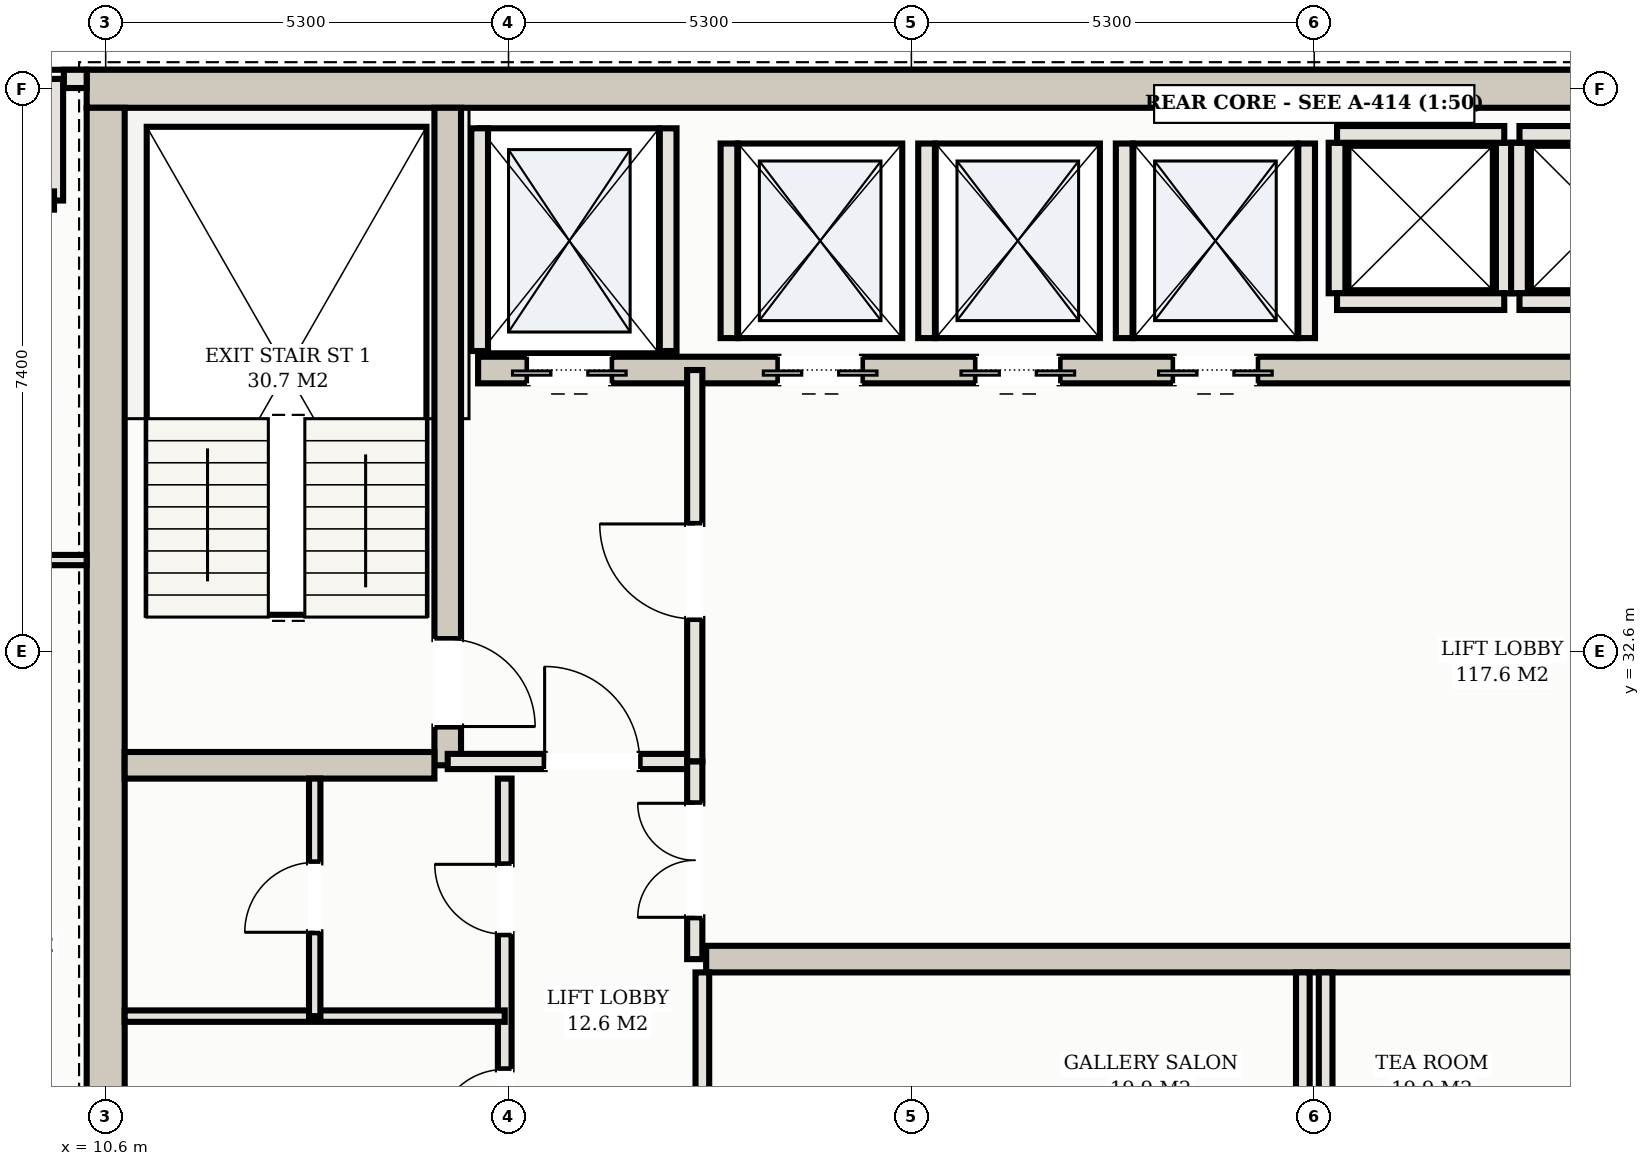
"""IFC4 building model, lengths in metres.
Left out: names, types, materials, properties, quantities, classifications, styles, units other than length and angle.
Written with IfcOpenShell. Run it as: python <this file> out.ifc"""

import sys

from ifc_helpers import new_model, si_unit, direction, frame, frame_2d, origin, place, context, subcontext, project, spatial, rectangle, extrude, element, fill, save


model = new_model("IFC4")
c1 = context("Model", 3, precision=1e-05, world=origin(), true_north=direction((0.0, 1.0)))
c2 = subcontext(c1, "Body", "Model", "MODEL_VIEW")
j1 = project(units=[si_unit("LENGTHUNIT", "METRE"), si_unit("PLANEANGLEUNIT", "RADIAN")], contexts=[c1])
p1 = place(None, origin())
s1 = spatial("IfcSite", under=j1, at=p1, CompositionType="ELEMENT")
p2 = place(p1, origin())
s2 = spatial("IfcBuilding", under=s1, at=p2, CompositionType="ELEMENT")
p3 = place(p2, frame((0.0, 0.0, 200.0)))
s3 = spatial("IfcBuildingStorey", under=s2, at=p3, CompositionType="ELEMENT", Elevation=200.0)
p4 = place(p3, frame((10.35, 40.0, 0.0), z_axis=(0.0, 0.0, 1.0), x_axis=(1.0, 0.0, 0.0)))
e1 = element("IfcWall", 1, at=p4, inside=s3, PredefinedType="SHEAR", context=c2, shape_type="SweptSolid", body=[
    extrude(rectangle(XDim=32.3, YDim=0.5, at=frame_2d((16.15, 0.0))), origin(), (0.0, 0.0, 1.0), 3.11),
])
p5 = place(p3, frame((10.6, 25.45, 0.0), z_axis=(0.0, 0.0, 1.0), x_axis=(0.0, 1.0, 0.0)))
e2 = element("IfcWall", 2, at=p5, inside=s3, PredefinedType="SHEAR", context=c2, shape_type="SweptSolid", body=[
    extrude(rectangle(XDim=14.3, YDim=0.5, at=frame_2d((7.15, 0.0))), origin(), (0.0, 0.0, 1.0), 3.11),
])
p6 = place(p3, frame((15.1, 31.1, 0.0), z_axis=(0.0, 0.0, 1.0), x_axis=(0.0, 1.0, 0.0)))
e3 = element("IfcWall", 3, at=p6, inside=s3, PredefinedType="SHEAR", context=c2, shape_type="SweptSolid", body=[
    extrude(rectangle(XDim=8.65, YDim=0.35, at=frame_2d((4.325, 0.0))), origin(), (0.0, 0.0, 1.0), 3.11),
])
p7 = place(p6, frame((0.51, 0.0, 0.0)))
e4 = element("IfcOpeningElement", 4, at=p7, cuts=e3, PredefinedType="OPENING", context=c2, shape_type="SweptSolid", body=[
    extrude(rectangle(XDim=1.15, YDim=2.2, at=frame_2d((0.575, 1.1))), frame((0.0, 0.185, 0.0), z_axis=(0.0, -1.0, 0.0), x_axis=(1.0, 0.0, 0.0)), (0.0, 0.0, 1.0), 0.37),
])
p8 = place(p3, frame((10.85, 31.1, 0.0), z_axis=(0.0, 0.0, 1.0), x_axis=(1.0, 0.0, 0.0)))
e5 = element("IfcWall", 5, at=p8, inside=s3, PredefinedType="SHEAR", context=c2, shape_type="SweptSolid", body=[
    extrude(rectangle(XDim=4.075, YDim=0.35, at=frame_2d((2.038, 0.0))), origin(), (0.0, 0.0, 1.0), 3.11),
])
p9 = place(p3, frame((15.5, 36.3, 0.0), z_axis=(0.0, 0.0, 1.0), x_axis=(1.0, 0.0, 0.0)))
e6 = element("IfcWall", 6, at=p9, inside=s3, PredefinedType="SHEAR", context=c2, shape_type="SweptSolid", body=[
    extrude(rectangle(XDim=22.0, YDim=0.35, at=frame_2d((11.0, 0.0))), origin(), (0.0, 0.0, 1.0), 3.11),
])
p10 = place(p9, frame((0.65, 0.0, 0.0)))
e7 = element("IfcOpeningElement", 7, at=p10, cuts=e6, PredefinedType="OPENING", context=c2, shape_type="SweptSolid", body=[
    extrude(rectangle(XDim=1.1, YDim=2.15, at=frame_2d((0.55, 1.075))), frame((0.0, 0.185, 0.0), z_axis=(0.0, -1.0, 0.0), x_axis=(1.0, 0.0, 0.0)), (0.0, 0.0, 1.0), 0.37),
])
p11 = place(p9, frame((20.25, 0.0, 0.0)))
e8 = element("IfcOpeningElement", 8, at=p11, cuts=e6, PredefinedType="OPENING", context=c2, shape_type="SweptSolid", body=[
    extrude(rectangle(XDim=1.1, YDim=2.15, at=frame_2d((0.55, 1.075))), frame((0.0, 0.185, 0.0), z_axis=(0.0, -1.0, 0.0), x_axis=(1.0, 0.0, 0.0)), (0.0, 0.0, 1.0), 0.37),
])
p12 = place(p9, frame((17.05, 0.0, 0.0)))
e9 = element("IfcOpeningElement", 9, at=p12, cuts=e6, PredefinedType="OPENING", context=c2, shape_type="SweptSolid", body=[
    extrude(rectangle(XDim=1.3, YDim=2.2, at=frame_2d((0.65, 1.1))), frame((0.0, 0.185, 0.0), z_axis=(0.0, -1.0, 0.0), x_axis=(1.0, 0.0, 0.0)), (0.0, 0.0, 1.0), 0.37),
])
p13 = place(p9, frame((3.95, 0.0, 0.0)))
e10 = element("IfcOpeningElement", 10, at=p13, cuts=e6, PredefinedType="OPENING", context=c2, shape_type="SweptSolid", body=[
    extrude(rectangle(XDim=1.1, YDim=2.15, at=frame_2d((0.55, 1.075))), frame((0.0, 0.185, 0.0), z_axis=(0.0, -1.0, 0.0), x_axis=(1.0, 0.0, 0.0)), (0.0, 0.0, 1.0), 0.37),
])
p14 = place(p9, frame((6.55, 0.0, 0.0)))
e11 = element("IfcOpeningElement", 11, at=p14, cuts=e6, PredefinedType="OPENING", context=c2, shape_type="SweptSolid", body=[
    extrude(rectangle(XDim=1.1, YDim=2.15, at=frame_2d((0.55, 1.075))), frame((0.0, 0.185, 0.0), z_axis=(0.0, -1.0, 0.0), x_axis=(1.0, 0.0, 0.0)), (0.0, 0.0, 1.0), 0.37),
])
p15 = place(p9, frame((9.15, 0.0, 0.0)))
e12 = element("IfcOpeningElement", 12, at=p15, cuts=e6, PredefinedType="OPENING", context=c2, shape_type="SweptSolid", body=[
    extrude(rectangle(XDim=1.1, YDim=2.15, at=frame_2d((0.55, 1.075))), frame((0.0, 0.185, 0.0), z_axis=(0.0, -1.0, 0.0), x_axis=(1.0, 0.0, 0.0)), (0.0, 0.0, 1.0), 0.37),
])
p16 = place(p3, frame((18.5, 28.55, 0.0), z_axis=(0.0, 0.0, 1.0), x_axis=(1.0, 0.0, 0.0)))
e13 = element("IfcWall", 13, at=p16, inside=s3, PredefinedType="SHEAR", context=c2, shape_type="SweptSolid", body=[
    extrude(rectangle(XDim=16.0, YDim=0.35, at=frame_2d((8.0, 0.0))), origin(), (0.0, 0.0, 1.0), 3.11),
])
for number, where, z_axis, x_axis in (
    (14, (15.52, 36.55, 0.0), (0.0, 0.0, 1.0), (0.0, 1.0, 0.0)),
    (15, (18.0, 36.55, 0.0), (0.0, 0.0, 1.0), (0.0, 1.0, 0.0)),
):
    element("IfcWall", number, at=place(p3, frame(where, z_axis=z_axis, x_axis=x_axis)), inside=s3, PredefinedType="SOLIDWALL", context=c2, shape_type="SweptSolid", body=[
        extrude(rectangle(XDim=2.93, YDim=0.22, at=frame_2d((1.465, 0.0))), origin(), (0.0, 0.0, 1.0), 3.11),
    ])
for number, where, z_axis, x_axis in (
    (16, (18.8, 36.72, 0.0), (0.0, 0.0, 1.0), (0.0, 1.0, 0.0)),
    (17, (21.4, 36.72, 0.0), (0.0, 0.0, 1.0), (0.0, 1.0, 0.0)),
    (18, (24.0, 36.72, 0.0), (0.0, 0.0, 1.0), (0.0, 1.0, 0.0)),
    (19, (26.4, 36.72, 0.0), (0.0, 0.0, 1.0), (0.0, 1.0, 0.0)),
):
    element("IfcWall", number, at=place(p3, frame(where, z_axis=z_axis, x_axis=x_axis)), inside=s3, PredefinedType="SOLIDWALL", context=c2, shape_type="SweptSolid", body=[
        extrude(rectangle(XDim=2.56, YDim=0.22, at=frame_2d((1.28, 0.0))), origin(), (0.0, 0.0, 1.0), 3.11),
    ])
for number, where, z_axis, x_axis in (
    (20, (26.8, 37.31, 0.0), (0.0, 0.0, 1.0), (0.0, 1.0, 0.0)),
    (21, (29.0, 37.31, 0.0), (0.0, 0.0, 1.0), (0.0, 1.0, 0.0)),
):
    element("IfcWall", number, at=place(p3, frame(where, z_axis=z_axis, x_axis=x_axis)), inside=s3, PredefinedType="SOLIDWALL", context=c2, shape_type="SweptSolid", body=[
        extrude(rectangle(XDim=1.98, YDim=0.22, at=frame_2d((0.99, 0.0))), origin(), (0.0, 0.0, 1.0), 3.11),
    ])
for number, where, z_axis, x_axis in (
    (22, (26.8, 39.4, 0.0), (0.0, 0.0, 1.0), (1.0, 0.0, 0.0)),
    (23, (26.8, 37.2, 0.0), (0.0, 0.0, 1.0), (1.0, 0.0, 0.0)),
):
    element("IfcWall", number, at=place(p3, frame(where, z_axis=z_axis, x_axis=x_axis)), inside=s3, PredefinedType="SOLIDWALL", context=c2, shape_type="SweptSolid", body=[
        extrude(rectangle(XDim=2.2, YDim=0.22, at=frame_2d((1.1, 0.0))), origin(), (0.0, 0.0, 1.0), 3.11),
    ])
p17 = place(p3, frame((29.2, 37.31, 0.0), z_axis=(0.0, 0.0, 1.0), x_axis=(0.0, 1.0, 0.0)))
e24 = element("IfcWall", 24, at=p17, inside=s3, PredefinedType="SOLIDWALL", context=c2, shape_type="SweptSolid", body=[
    extrude(rectangle(XDim=1.98, YDim=0.22, at=frame_2d((0.99, 0.0))), origin(), (0.0, 0.0, 1.0), 3.11),
])
for number, where, z_axis, x_axis in (
    (25, (29.2, 39.4, 0.0), (0.0, 0.0, 1.0), (1.0, 0.0, 0.0)),
    (26, (29.2, 37.2, 0.0), (0.0, 0.0, 1.0), (1.0, 0.0, 0.0)),
):
    element("IfcWall", number, at=place(p3, frame(where, z_axis=z_axis, x_axis=x_axis)), inside=s3, PredefinedType="SOLIDWALL", context=c2, shape_type="SweptSolid", body=[
        extrude(rectangle(XDim=2.2, YDim=0.22, at=frame_2d((1.1, 0.0))), origin(), (0.0, 0.0, 1.0), 3.11),
    ])
p18 = place(p3, frame((10.35, 40.13, 0.0), z_axis=(0.0, 0.0, 1.0), x_axis=(-1.0, 0.0, 0.0)))
e27 = element("IfcWall", 27, at=p18, inside=s3, PredefinedType="SOLIDWALL", context=c2, shape_type="SweptSolid", body=[
    extrude(rectangle(XDim=0.3, YDim=0.24, at=frame_2d((0.15, 0.0))), origin(), (0.0, 0.0, 1.0), 3.11),
])
for number, where, z_axis, x_axis in (
    (28, (9.92, 40.13, 0.0), (0.0, 0.0, 1.0), (0.0, -1.0, 0.0)),
    (29, (9.92, 38.53, 0.0), (0.0, 0.0, 1.0), (-1.0, 0.0, 0.0)),
):
    element("IfcWall", number, at=place(p3, frame(where, z_axis=z_axis, x_axis=x_axis)), inside=s3, PredefinedType="SOLIDWALL", context=c2, shape_type="SweptSolid", body=[
        extrude(rectangle(XDim=1.6, YDim=0.24, at=frame_2d((0.8, 0.0))), origin(), (0.0, 0.0, 1.0), 3.11),
    ])
p19 = place(p3, frame((15.1, 31.15, 0.0), z_axis=(0.0, 0.0, 1.0), x_axis=(1.0, 0.0, 0.0)))
e30 = element("IfcWall", 30, at=p19, inside=s3, PredefinedType="PARTITIONING", context=c2, shape_type="SweptSolid", body=[
    extrude(rectangle(XDim=3.25, YDim=0.2, at=frame_2d((1.625, 0.0))), origin(), (0.0, 0.0, 1.0), 2.43),
])
p20 = place(p19, frame((1.275, 0.0, 0.0)))
e31 = element("IfcOpeningElement", 31, at=p20, cuts=e30, PredefinedType="OPENING", context=c2, shape_type="SweptSolid", body=[
    extrude(rectangle(XDim=1.25, YDim=2.2, at=frame_2d((0.625, 1.1))), frame((0.0, 0.11, 0.0), z_axis=(0.0, -1.0, 0.0), x_axis=(1.0, 0.0, 0.0)), (0.0, 0.0, 1.0), 0.22),
])
p21 = place(p3, frame((18.35, 31.15, 0.0), z_axis=(0.0, 0.0, 1.0), x_axis=(0.0, 1.0, 0.0)))
e32 = element("IfcWall", 32, at=p21, inside=s3, PredefinedType="PARTITIONING", context=c2, shape_type="SweptSolid", body=[
    extrude(rectangle(XDim=5.15, YDim=0.2, at=frame_2d((2.575, 0.0))), origin(), (0.0, 0.0, 1.0), 2.43),
])
p22 = place(p21, frame((1.875, 0.0, 0.0)))
e33 = element("IfcOpeningElement", 33, at=p22, cuts=e32, PredefinedType="OPENING", context=c2, shape_type="SweptSolid", body=[
    extrude(rectangle(XDim=1.25, YDim=2.2, at=frame_2d((0.625, 1.1))), frame((0.0, 0.11, 0.0), z_axis=(0.0, -1.0, 0.0), x_axis=(1.0, 0.0, 0.0)), (0.0, 0.0, 1.0), 0.22),
])
p23 = place(p3, frame((15.85, 25.45, 0.0), z_axis=(0.0, 0.0, 1.0), x_axis=(0.0, 1.0, 0.0)))
e34 = element("IfcWall", 34, at=p23, inside=s3, PredefinedType="PARTITIONING", context=c2, shape_type="SweptSolid", body=[
    extrude(rectangle(XDim=5.475, YDim=0.18, at=frame_2d((2.738, 0.0))), origin(), (0.0, 0.0, 1.0), 2.43),
])
p24 = place(p23, frame((0.75, 0.0, 0.0)))
e35 = element("IfcOpeningElement", 35, at=p24, cuts=e34, PredefinedType="OPENING", context=c2, shape_type="SweptSolid", body=[
    extrude(rectangle(XDim=0.9, YDim=2.15, at=frame_2d((0.45, 1.075))), frame((0.0, 0.1, 0.0), z_axis=(0.0, -1.0, 0.0), x_axis=(1.0, 0.0, 0.0)), (0.0, 0.0, 1.0), 0.2),
])
p25 = place(p23, frame((3.427, 0.0, 0.0)))
e36 = element("IfcOpeningElement", 36, at=p25, cuts=e34, PredefinedType="OPENING", context=c2, shape_type="SweptSolid", body=[
    extrude(rectangle(XDim=0.92, YDim=2.15, at=frame_2d((0.46, 1.075))), frame((0.0, 0.1, 0.0), z_axis=(0.0, -1.0, 0.0), x_axis=(1.0, 0.0, 0.0)), (0.0, 0.0, 1.0), 0.2),
])
p26 = place(p3, frame((10.85, 27.8, 0.0), z_axis=(0.0, 0.0, 1.0), x_axis=(1.0, 0.0, 0.0)))
e37 = element("IfcWall", 37, at=p26, inside=s3, PredefinedType="PARTITIONING", context=c2, shape_type="SweptSolid", body=[
    extrude(rectangle(XDim=5.0, YDim=0.15, at=frame_2d((2.5, 0.0))), origin(), (0.0, 0.0, 1.0), 2.43),
])
p27 = place(p3, frame((13.35, 27.8, 0.0), z_axis=(0.0, 0.0, 1.0), x_axis=(0.0, 1.0, 0.0)))
e38 = element("IfcWall", 38, at=p27, inside=s3, PredefinedType="PARTITIONING", context=c2, shape_type="SweptSolid", body=[
    extrude(rectangle(XDim=3.125, YDim=0.15, at=frame_2d((1.562, 0.0))), origin(), (0.0, 0.0, 1.0), 2.43),
])
p28 = place(p27, frame((1.103, 0.0, 0.0)))
e39 = element("IfcOpeningElement", 39, at=p28, cuts=e38, PredefinedType="OPENING", context=c2, shape_type="SweptSolid", body=[
    extrude(rectangle(XDim=0.92, YDim=2.15, at=frame_2d((0.46, 1.075))), frame((0.0, 0.085, 0.0), z_axis=(0.0, -1.0, 0.0), x_axis=(1.0, 0.0, 0.0)), (0.0, 0.0, 1.0), 0.17),
])
p29 = place(p3, frame((18.35, 28.55, 0.0), z_axis=(0.0, 0.0, 1.0), x_axis=(0.0, 1.0, 0.0)))
e40 = element("IfcWall", 40, at=p29, inside=s3, PredefinedType="PARTITIONING", context=c2, shape_type="SweptSolid", body=[
    extrude(rectangle(XDim=2.6, YDim=0.2, at=frame_2d((1.3, 0.0))), origin(), (0.0, 0.0, 1.0), 2.43),
])
p30 = place(p29, frame((0.55, 0.0, 0.0)))
e41 = element("IfcOpeningElement", 41, at=p30, cuts=e40, PredefinedType="OPENING", context=c2, shape_type="SweptSolid", body=[
    extrude(rectangle(XDim=1.5, YDim=2.25, at=frame_2d((0.75, 1.125))), frame((0.0, 0.11, 0.0), z_axis=(0.0, -1.0, 0.0), x_axis=(1.0, 0.0, 0.0)), (0.0, 0.0, 1.0), 0.22),
])
for number, where, z_axis, x_axis in (
    (42, (18.45, 25.62, 0.0), (0.0, 0.0, 1.0), (0.0, 1.0, 0.0)),
    (43, (26.35, 25.62, 0.0), (0.0, 0.0, 1.0), (0.0, 1.0, 0.0)),
    (44, (26.65, 25.62, 0.0), (0.0, 0.0, 1.0), (0.0, 1.0, 0.0)),
):
    element("IfcWall", number, at=place(p3, frame(where, z_axis=z_axis, x_axis=x_axis)), inside=s3, PredefinedType="PARTITIONING", context=c2, shape_type="SweptSolid", body=[
        extrude(rectangle(XDim=2.755, YDim=0.18, at=frame_2d((1.377, 0.0))), origin(), (0.0, 0.0, 1.0), 2.43),
    ])
p31 = place(p3, frame((6.72, 33.8, 0.0), z_axis=(0.0, 0.0, 1.0), x_axis=(1.0, 0.0, 0.0)))
e45 = element("IfcWall", 45, at=p31, inside=s3, PredefinedType="PARTITIONING", context=c2, shape_type="SweptSolid", body=[
    extrude(rectangle(XDim=3.63, YDim=0.135, at=frame_2d((1.815, 0.0))), origin(), (0.0, 0.0, 1.0), 2.43),
])
p32 = place(p31, frame((1.355, 0.0, 0.0)))
e46 = element("IfcOpeningElement", 46, at=p32, cuts=e45, PredefinedType="OPENING", context=c2, shape_type="SweptSolid", body=[
    extrude(rectangle(XDim=0.92, YDim=2.15, at=frame_2d((0.46, 1.075))), frame((0.0, 0.078, 0.0), z_axis=(0.0, -1.0, 0.0), x_axis=(1.0, 0.0, 0.0)), (0.0, 0.0, 1.0), 0.155),
])
p33 = place(p10, frame((1.1, 0.0, 0.0), z_axis=(0.0, 0.0, 1.0), x_axis=(-1.0, 0.0, 0.0)))
e47 = element("IfcDoor", 47, at=p33, inside=s3, OperationType="DOUBLE_DOOR_SLIDING", PredefinedType="DOOR", context=c2, shape_type="SweptSolid", body=[
    extrude(rectangle(XDim=1.1, YDim=2.15, at=frame_2d((0.55, 1.075))), frame((0.0, 0.025, 0.0), z_axis=(0.0, -1.0, 0.0), x_axis=(1.0, 0.0, 0.0)), (0.0, 0.0, 1.0), 0.05),
])
fill(e7, e47)
p34 = place(p13, frame((1.1, 0.0, 0.0), z_axis=(0.0, 0.0, 1.0), x_axis=(-1.0, 0.0, 0.0)))
e48 = element("IfcDoor", 48, at=p34, inside=s3, OperationType="DOUBLE_DOOR_SLIDING", PredefinedType="DOOR", context=c2, shape_type="SweptSolid", body=[
    extrude(rectangle(XDim=1.1, YDim=2.15, at=frame_2d((0.55, 1.075))), frame((0.0, 0.025, 0.0), z_axis=(0.0, -1.0, 0.0), x_axis=(1.0, 0.0, 0.0)), (0.0, 0.0, 1.0), 0.05),
])
fill(e10, e48)
p35 = place(p14, frame((1.1, 0.0, 0.0), z_axis=(0.0, 0.0, 1.0), x_axis=(-1.0, 0.0, 0.0)))
e49 = element("IfcDoor", 49, at=p35, inside=s3, OperationType="DOUBLE_DOOR_SLIDING", PredefinedType="DOOR", context=c2, shape_type="SweptSolid", body=[
    extrude(rectangle(XDim=1.1, YDim=2.15, at=frame_2d((0.55, 1.075))), frame((0.0, 0.025, 0.0), z_axis=(0.0, -1.0, 0.0), x_axis=(1.0, 0.0, 0.0)), (0.0, 0.0, 1.0), 0.05),
])
fill(e11, e49)
p36 = place(p15, frame((1.1, 0.0, 0.0), z_axis=(0.0, 0.0, 1.0), x_axis=(-1.0, 0.0, 0.0)))
e50 = element("IfcDoor", 50, at=p36, inside=s3, OperationType="DOUBLE_DOOR_SLIDING", PredefinedType="DOOR", context=c2, shape_type="SweptSolid", body=[
    extrude(rectangle(XDim=1.1, YDim=2.15, at=frame_2d((0.55, 1.075))), frame((0.0, 0.025, 0.0), z_axis=(0.0, -1.0, 0.0), x_axis=(1.0, 0.0, 0.0)), (0.0, 0.0, 1.0), 0.05),
])
fill(e12, e50)
p37 = place(p20, origin())
e51 = element("IfcDoor", 51, at=p37, inside=s3, OperationType="SINGLE_SWING_LEFT", PredefinedType="DOOR", context=c2, shape_type="SweptSolid", body=[
    extrude(rectangle(XDim=1.25, YDim=2.2, at=frame_2d((0.625, 1.1))), frame((0.0, 0.025, 0.0), z_axis=(0.0, -1.0, 0.0), x_axis=(1.0, 0.0, 0.0)), (0.0, 0.0, 1.0), 0.05),
])
fill(e31, e51)
p38 = place(p22, origin())
e52 = element("IfcDoor", 52, at=p38, inside=s3, OperationType="SINGLE_SWING_RIGHT", PredefinedType="DOOR", context=c2, shape_type="SweptSolid", body=[
    extrude(rectangle(XDim=1.25, YDim=2.2, at=frame_2d((0.625, 1.1))), frame((0.0, 0.025, 0.0), z_axis=(0.0, -1.0, 0.0), x_axis=(1.0, 0.0, 0.0)), (0.0, 0.0, 1.0), 0.05),
])
fill(e33, e52)
p39 = place(p7, frame((1.15, 0.0, 0.0), z_axis=(0.0, 0.0, 1.0), x_axis=(-1.0, 0.0, 0.0)))
e53 = element("IfcDoor", 53, at=p39, inside=s3, OperationType="SINGLE_SWING_RIGHT", PredefinedType="DOOR", context=c2, shape_type="SweptSolid", body=[
    extrude(rectangle(XDim=1.15, YDim=2.2, at=frame_2d((0.575, 1.1))), frame((0.0, 0.025, 0.0), z_axis=(0.0, -1.0, 0.0), x_axis=(1.0, 0.0, 0.0)), (0.0, 0.0, 1.0), 0.05),
])
fill(e4, e53)
p40 = place(p24, origin())
e54 = element("IfcDoor", 54, at=p40, inside=s3, OperationType="SINGLE_SWING_LEFT", PredefinedType="DOOR", context=c2, shape_type="SweptSolid", body=[
    extrude(rectangle(XDim=0.9, YDim=2.15, at=frame_2d((0.45, 1.075))), frame((0.0, 0.025, 0.0), z_axis=(0.0, -1.0, 0.0), x_axis=(1.0, 0.0, 0.0)), (0.0, 0.0, 1.0), 0.05),
])
fill(e35, e54)
p41 = place(p25, origin())
e55 = element("IfcDoor", 55, at=p41, inside=s3, OperationType="SINGLE_SWING_RIGHT", PredefinedType="DOOR", context=c2, shape_type="SweptSolid", body=[
    extrude(rectangle(XDim=0.92, YDim=2.15, at=frame_2d((0.46, 1.075))), frame((0.0, 0.025, 0.0), z_axis=(0.0, -1.0, 0.0), x_axis=(1.0, 0.0, 0.0)), (0.0, 0.0, 1.0), 0.05),
])
fill(e36, e55)
p42 = place(p28, origin())
e56 = element("IfcDoor", 56, at=p42, inside=s3, OperationType="SINGLE_SWING_LEFT", PredefinedType="DOOR", context=c2, shape_type="SweptSolid", body=[
    extrude(rectangle(XDim=0.92, YDim=2.15, at=frame_2d((0.46, 1.075))), frame((0.0, 0.025, 0.0), z_axis=(0.0, -1.0, 0.0), x_axis=(1.0, 0.0, 0.0)), (0.0, 0.0, 1.0), 0.05),
])
fill(e39, e56)
p43 = place(p30, origin())
e57 = element("IfcDoor", 57, at=p43, inside=s3, OperationType="DOUBLE_DOOR_SINGLE_SWING", PredefinedType="DOOR", context=c2, shape_type="SweptSolid", body=[
    extrude(rectangle(XDim=1.5, YDim=2.25, at=frame_2d((0.75, 1.125))), frame((0.0, 0.025, 0.0), z_axis=(0.0, -1.0, 0.0), x_axis=(1.0, 0.0, 0.0)), (0.0, 0.0, 1.0), 0.05),
])
fill(e41, e57)
save(model, sys.argv[1])
